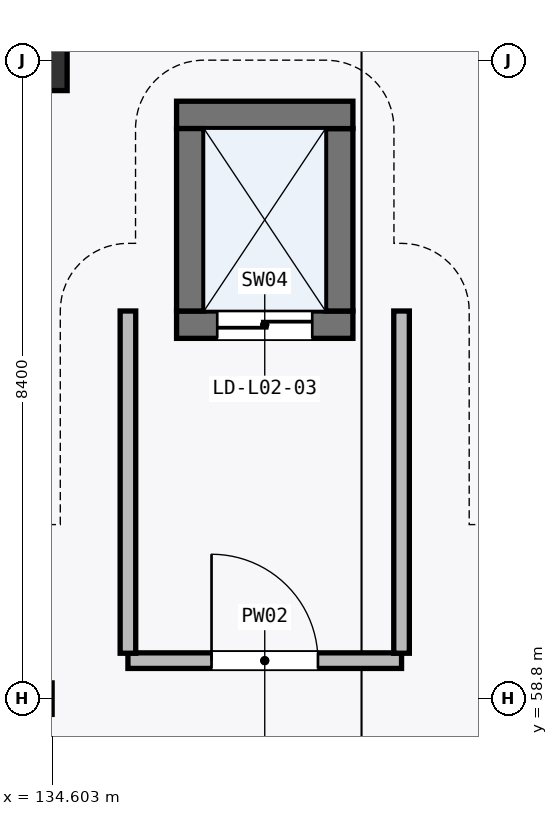
"""IFC4 building model, lengths in metres.
Left out: names, types, materials, properties, quantities, classifications, styles, units other than length and angle.
Written with IfcOpenShell. Run it as: python <this file> out.ifc"""

import sys

from ifc_helpers import new_model, si_unit, direction, frame, frame_2d, origin, origin_2d, place, context, subcontext, project, spatial, rectangle, i_section, extrude, element, fill, save


model = new_model("IFC4")
c1 = context("Model", 3, precision=1e-05, world=origin(), true_north=direction((0.0, 1.0)))
c2 = subcontext(c1, "Body", "Model", "MODEL_VIEW")
j1 = project(units=[si_unit("LENGTHUNIT", "METRE"), si_unit("PLANEANGLEUNIT", "RADIAN")], contexts=[c1])
p1 = place(None, origin())
s1 = spatial("IfcSite", under=j1, at=p1, CompositionType="ELEMENT")
p2 = place(p1, origin())
s2 = spatial("IfcBuilding", under=s1, at=p2, CompositionType="ELEMENT")
p3 = place(p2, frame((0.0, 0.0, 6.0)))
s3 = spatial("IfcBuildingStorey", under=s2, at=p3, CompositionType="ELEMENT", Elevation=6.0)
p4 = place(p3, frame((134.4, 58.8, 0.0), z_axis=(0.0, 0.0, 1.0), x_axis=(1.0, 0.0, 0.0)))
e1 = element("IfcColumn", 1, at=p4, inside=s3, PredefinedType="COLUMN", context=c2, shape_type="SweptSolid", body=[
    extrude(i_section(OverallWidth=0.405, OverallDepth=0.414, WebThickness=0.018, FlangeThickness=0.028, FilletRadius=0.022, at=origin_2d()), origin(), (0.0, 0.0, 1.0), 5.4),
])
p5 = place(p3, frame((134.4, 67.2, 0.0), z_axis=(0.0, 0.0, 1.0), x_axis=(1.0, 0.0, 0.0)))
e2 = element("IfcColumn", 2, at=p5, inside=s3, PredefinedType="COLUMN", context=c2, shape_type="SweptSolid", body=[
    extrude(rectangle(XDim=0.8, YDim=0.8, at=origin_2d()), origin(), (0.0, 0.0, 1.0), 5.4),
])
p6 = place(p3, frame((136.24, 63.72, 0.0), z_axis=(0.0, 0.0, 1.0), x_axis=(1.0, 0.0, 0.0)))
e3 = element("IfcWall", 3, at=p6, inside=s3, PredefinedType="SHEAR", context=c2, shape_type="SweptSolid", body=[
    extrude(rectangle(XDim=2.32, YDim=0.36, at=frame_2d((1.16, 0.0))), origin(), (0.0, 0.0, 1.0), 5.145),
])
p7 = place(p6, frame((0.535, 0.0, 0.0)))
e4 = element("IfcOpeningElement", 4, at=p7, cuts=e3, PredefinedType="OPENING", context=c2, shape_type="SweptSolid", body=[
    extrude(rectangle(XDim=1.25, YDim=2.2, at=frame_2d((0.625, 1.1))), frame((0.0, 0.19, 0.0), z_axis=(0.0, -1.0, 0.0), x_axis=(1.0, 0.0, 0.0)), (0.0, 0.0, 1.0), 0.38),
])
p8 = place(p3, frame((138.38, 63.9, 0.0), z_axis=(0.0, 0.0, 1.0), x_axis=(0.0, 1.0, 0.0)))
e5 = element("IfcWall", 5, at=p8, inside=s3, PredefinedType="SHEAR", context=c2, shape_type="SweptSolid", body=[
    extrude(rectangle(XDim=2.4, YDim=0.36, at=frame_2d((1.2, 0.0))), origin(), (0.0, 0.0, 1.0), 5.145),
])
p9 = place(p3, frame((138.56, 66.48, 0.0), z_axis=(0.0, 0.0, 1.0), x_axis=(-1.0, 0.0, 0.0)))
e6 = element("IfcWall", 6, at=p9, inside=s3, PredefinedType="SHEAR", context=c2, shape_type="SweptSolid", body=[
    extrude(rectangle(XDim=2.32, YDim=0.36, at=frame_2d((1.16, 0.0))), origin(), (0.0, 0.0, 1.0), 5.145),
])
p10 = place(p3, frame((136.42, 66.3, 0.0), z_axis=(0.0, 0.0, 1.0), x_axis=(0.0, -1.0, 0.0)))
e7 = element("IfcWall", 7, at=p10, inside=s3, PredefinedType="SHEAR", context=c2, shape_type="SweptSolid", body=[
    extrude(rectangle(XDim=2.4, YDim=0.36, at=frame_2d((1.2, 0.0))), origin(), (0.0, 0.0, 1.0), 5.145),
])
p11 = place(p3, frame((135.6, 59.3, 0.0), z_axis=(0.0, 0.0, 1.0), x_axis=(1.0, 0.0, 0.0)))
e8 = element("IfcWall", 8, at=p11, inside=s3, PredefinedType="PARTITIONING", context=c2, shape_type="SweptSolid", body=[
    extrude(rectangle(XDim=3.6, YDim=0.205, at=frame_2d((1.8, 0.0))), origin(), (0.0, 0.0, 1.0), 5.145),
])
p12 = place(p11, frame((1.1, 0.0, 0.0)))
e9 = element("IfcOpeningElement", 9, at=p12, cuts=e8, PredefinedType="OPENING", context=c2, shape_type="SweptSolid", body=[
    extrude(rectangle(XDim=1.4, YDim=2.15, at=frame_2d((0.7, 1.075))), frame((0.0, 0.113, 0.0), z_axis=(0.0, -1.0, 0.0), x_axis=(1.0, 0.0, 0.0)), (0.0, 0.0, 1.0), 0.225),
])
for number, where, z_axis, x_axis in (
    (10, (139.2, 59.397, 0.0), (0.0, 0.0, 1.0), (0.0, 1.0, 0.0)),
    (11, (135.6, 63.9, 0.0), (0.0, 0.0, 1.0), (0.0, -1.0, 0.0)),
):
    element("IfcWall", number, at=place(p3, frame(where, z_axis=z_axis, x_axis=x_axis)), inside=s3, PredefinedType="PARTITIONING", context=c2, shape_type="SweptSolid", body=[
        extrude(rectangle(XDim=4.502, YDim=0.205, at=frame_2d((2.251, 0.0))), origin(), (0.0, 0.0, 1.0), 5.145),
    ])
p13 = place(p7, frame((1.25, 0.0, 0.0), z_axis=(0.0, 0.0, 1.0), x_axis=(-1.0, 0.0, 0.0)))
e12 = element("IfcDoor", 12, at=p13, inside=s3, OperationType="DOUBLE_DOOR_SLIDING", PredefinedType="DOOR", context=c2, shape_type="SweptSolid", body=[
    extrude(rectangle(XDim=1.25, YDim=2.2, at=frame_2d((0.625, 1.1))), frame((0.0, 0.025, 0.0), z_axis=(0.0, -1.0, 0.0), x_axis=(1.0, 0.0, 0.0)), (0.0, 0.0, 1.0), 0.05),
])
fill(e4, e12)
p14 = place(p12, origin())
e13 = element("IfcDoor", 13, at=p14, inside=s3, OperationType="SINGLE_SWING_LEFT", PredefinedType="DOOR", context=c2, shape_type="SweptSolid", body=[
    extrude(rectangle(XDim=1.4, YDim=2.15, at=frame_2d((0.7, 1.075))), frame((0.0, 0.025, 0.0), z_axis=(0.0, -1.0, 0.0), x_axis=(1.0, 0.0, 0.0)), (0.0, 0.0, 1.0), 0.05),
])
fill(e9, e13)
save(model, sys.argv[1])
